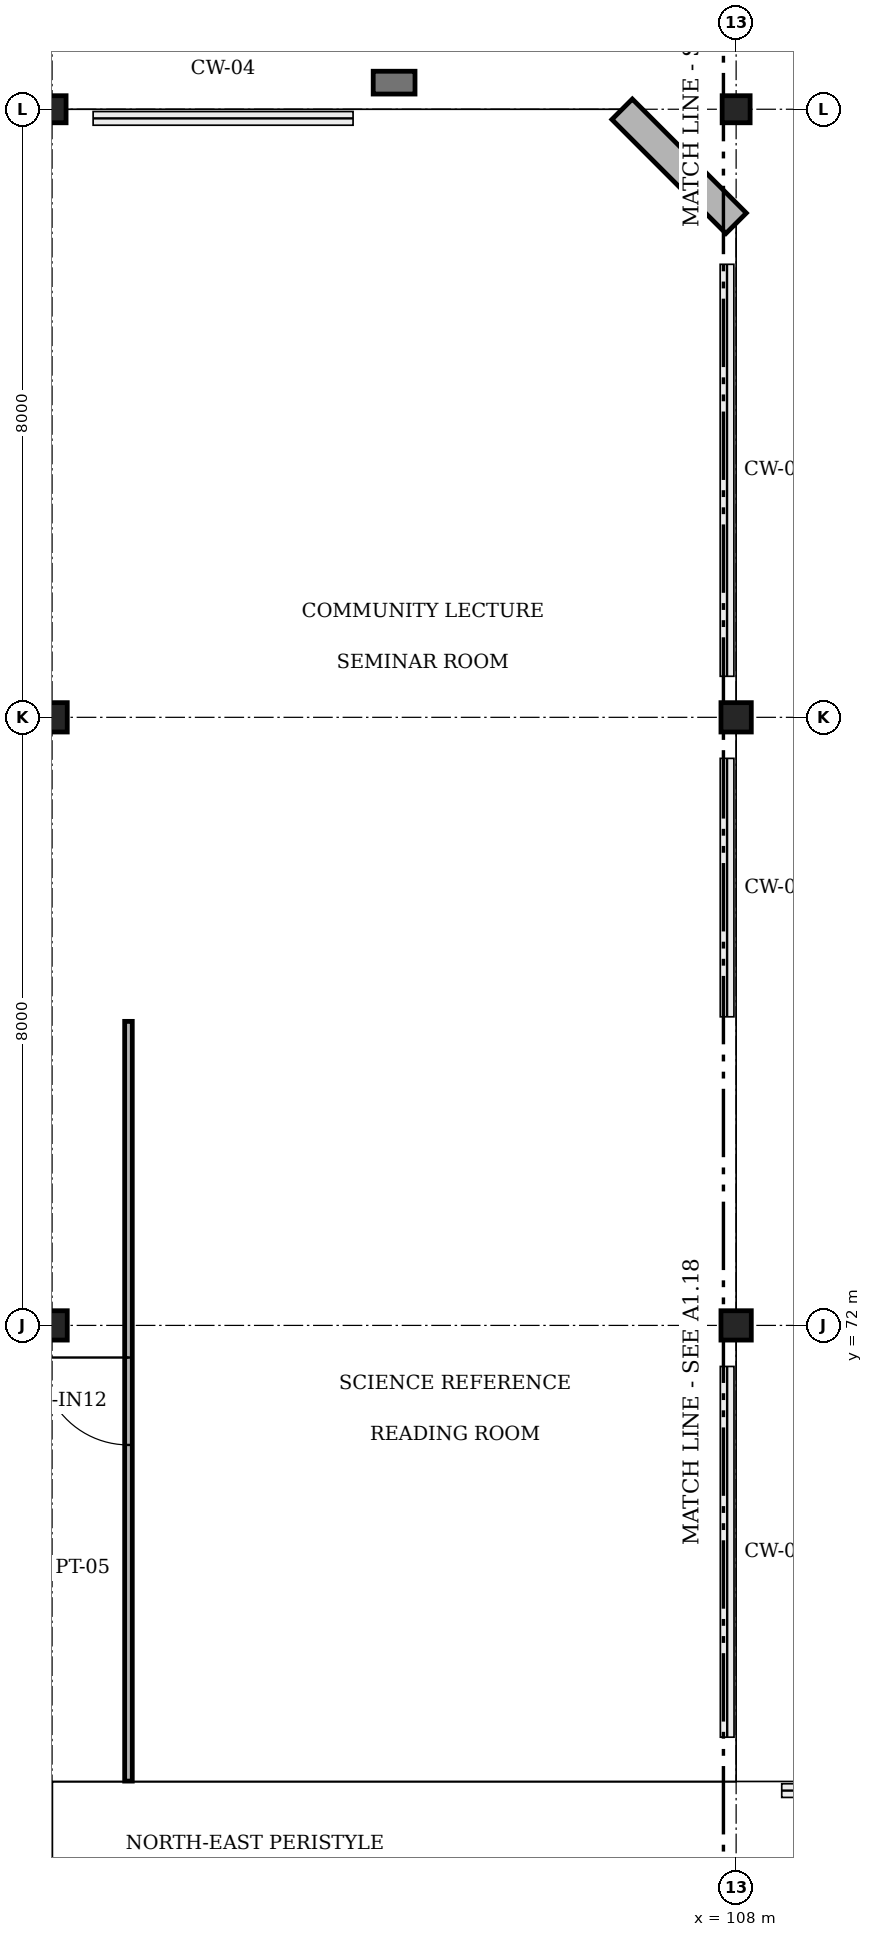
"""IFC4 building model, lengths in metres.
Left out: names, types, materials, properties, quantities, classifications, styles, units other than length and angle.
Written with IfcOpenShell. Run it as: python <this file> out.ifc"""

import sys

from ifc_helpers import new_model, si_unit, direction, frame, frame_2d, origin, origin_2d, place, context, subcontext, project, spatial, rectangle, i_section, extrude, element, fill, save


model = new_model("IFC4")
c1 = context("Model", 3, precision=1e-05, world=origin(), true_north=direction((0.0, 1.0)))
c2 = subcontext(c1, "Body", "Model", "MODEL_VIEW")
j1 = project(units=[si_unit("LENGTHUNIT", "METRE"), si_unit("PLANEANGLEUNIT", "RADIAN")], contexts=[c1])
p1 = place(None, origin())
s1 = spatial("IfcSite", under=j1, at=p1, CompositionType="ELEMENT")
p2 = place(p1, origin())
s2 = spatial("IfcBuilding", under=s1, at=p2, CompositionType="ELEMENT")
p3 = place(p2, origin())
s3 = spatial("IfcBuildingStorey", under=s2, at=p3, CompositionType="ELEMENT", Elevation=0.0)
for number, where, z_axis, x_axis in (
    (1, (99.0, 72.0, 0.0), (0.0, 0.0, 1.0), (1.0, 0.0, 0.0)),
    (2, (99.0, 80.0, 0.0), (0.0, 0.0, 1.0), (1.0, 0.0, 0.0)),
):
    element("IfcColumn", number, at=place(p3, frame(where, z_axis=z_axis, x_axis=x_axis)), inside=s3, PredefinedType="COLUMN", context=c2, shape_type="SweptSolid", body=[
        extrude(i_section(OverallWidth=0.399, OverallDepth=0.386, WebThickness=0.021, FlangeThickness=0.033, FilletRadius=0.015, at=origin_2d()), origin(), (0.0, 0.0, 1.0), 5.4),
    ])
p4 = place(p3, frame((99.0, 88.0, 0.0), z_axis=(0.0, 0.0, 1.0), x_axis=(1.0, 0.0, 0.0)))
e3 = element("IfcColumn", 3, at=p4, inside=s3, PredefinedType="COLUMN", context=c2, shape_type="SweptSolid", body=[
    extrude(i_section(OverallWidth=0.368, OverallDepth=0.356, WebThickness=0.011, FlangeThickness=0.018, FilletRadius=0.015, at=origin_2d()), origin(), (0.0, 0.0, 1.0), 5.4),
])
for number, where, z_axis, x_axis in (
    (4, (108.0, 72.0, 0.0), (0.0, 0.0, 1.0), (1.0, 0.0, 0.0)),
    (5, (108.0, 80.0, 0.0), (0.0, 0.0, 1.0), (1.0, 0.0, 0.0)),
):
    element("IfcColumn", number, at=place(p3, frame(where, z_axis=z_axis, x_axis=x_axis)), inside=s3, PredefinedType="COLUMN", context=c2, shape_type="SweptSolid", body=[
        extrude(i_section(OverallWidth=0.399, OverallDepth=0.386, WebThickness=0.021, FlangeThickness=0.033, FilletRadius=0.015, at=origin_2d()), origin(), (0.0, 0.0, 1.0), 5.4),
    ])
p5 = place(p3, frame((108.0, 88.0, 0.0), z_axis=(0.0, 0.0, 1.0), x_axis=(1.0, 0.0, 0.0)))
e6 = element("IfcColumn", 6, at=p5, inside=s3, PredefinedType="COLUMN", context=c2, shape_type="SweptSolid", body=[
    extrude(i_section(OverallWidth=0.368, OverallDepth=0.356, WebThickness=0.011, FlangeThickness=0.018, FilletRadius=0.015, at=origin_2d()), origin(), (0.0, 0.0, 1.0), 5.4),
])
p6 = place(p3, frame((103.5, 88.35, 0.0), z_axis=(0.0, 0.0, 1.0), x_axis=(1.0, 0.0, 0.0)))
e7 = element("IfcColumn", 7, at=p6, inside=s3, PredefinedType="PILASTER", context=c2, shape_type="SweptSolid", body=[
    extrude(rectangle(XDim=0.55, YDim=0.3, at=origin_2d()), origin(), (0.0, 0.0, 1.0), 5.4),
])
p7 = place(p3, frame((106.5, 88.0, 0.0), z_axis=(0.0, 0.0, 1.0), x_axis=(0.707106781187, -0.707106781187, 0.0)))
e8 = element("IfcWall", 8, at=p7, inside=s3, PredefinedType="SOLIDWALL", context=c2, shape_type="SweptSolid", body=[
    extrude(rectangle(XDim=2.121, YDim=0.38, at=frame_2d((1.061, 0.0))), origin(), (0.0, 0.0, 1.0), 4.305),
])
p8 = place(p3, frame((100.005, 66.005, 0.0), z_axis=(0.0, 0.0, 1.0), x_axis=(0.0, 1.0, 0.0)))
e9 = element("IfcWall", 9, at=p8, inside=s3, PredefinedType="PARTITIONING", context=c2, shape_type="SweptSolid", body=[
    extrude(rectangle(XDim=9.995, YDim=0.1, at=frame_2d((4.998, 0.0))), origin(), (0.0, 0.0, 1.0), 3.15),
])
p9 = place(p8, frame((4.423, 0.0, 0.0)))
e10 = element("IfcOpeningElement", 10, at=p9, cuts=e9, PredefinedType="OPENING", context=c2, shape_type="SweptSolid", body=[
    extrude(rectangle(XDim=1.15, YDim=2.15, at=frame_2d((0.575, 1.075))), frame((0.0, 0.06, 0.0), z_axis=(0.0, -1.0, 0.0), x_axis=(1.0, 0.0, 0.0)), (0.0, 0.0, 1.0), 0.12),
])
p10 = place(p9, origin())
e11 = element("IfcDoor", 11, at=p10, inside=s3, OperationType="SINGLE_SWING_RIGHT", PredefinedType="DOOR", context=c2, shape_type="SweptSolid", body=[
    extrude(rectangle(XDim=1.15, YDim=2.15, at=frame_2d((0.575, 1.075))), frame((0.0, 0.025, 0.0), z_axis=(0.0, -1.0, 0.0), x_axis=(1.0, 0.0, 0.0)), (0.0, 0.0, 1.0), 0.05),
])
fill(e10, e11)
save(model, sys.argv[1])
